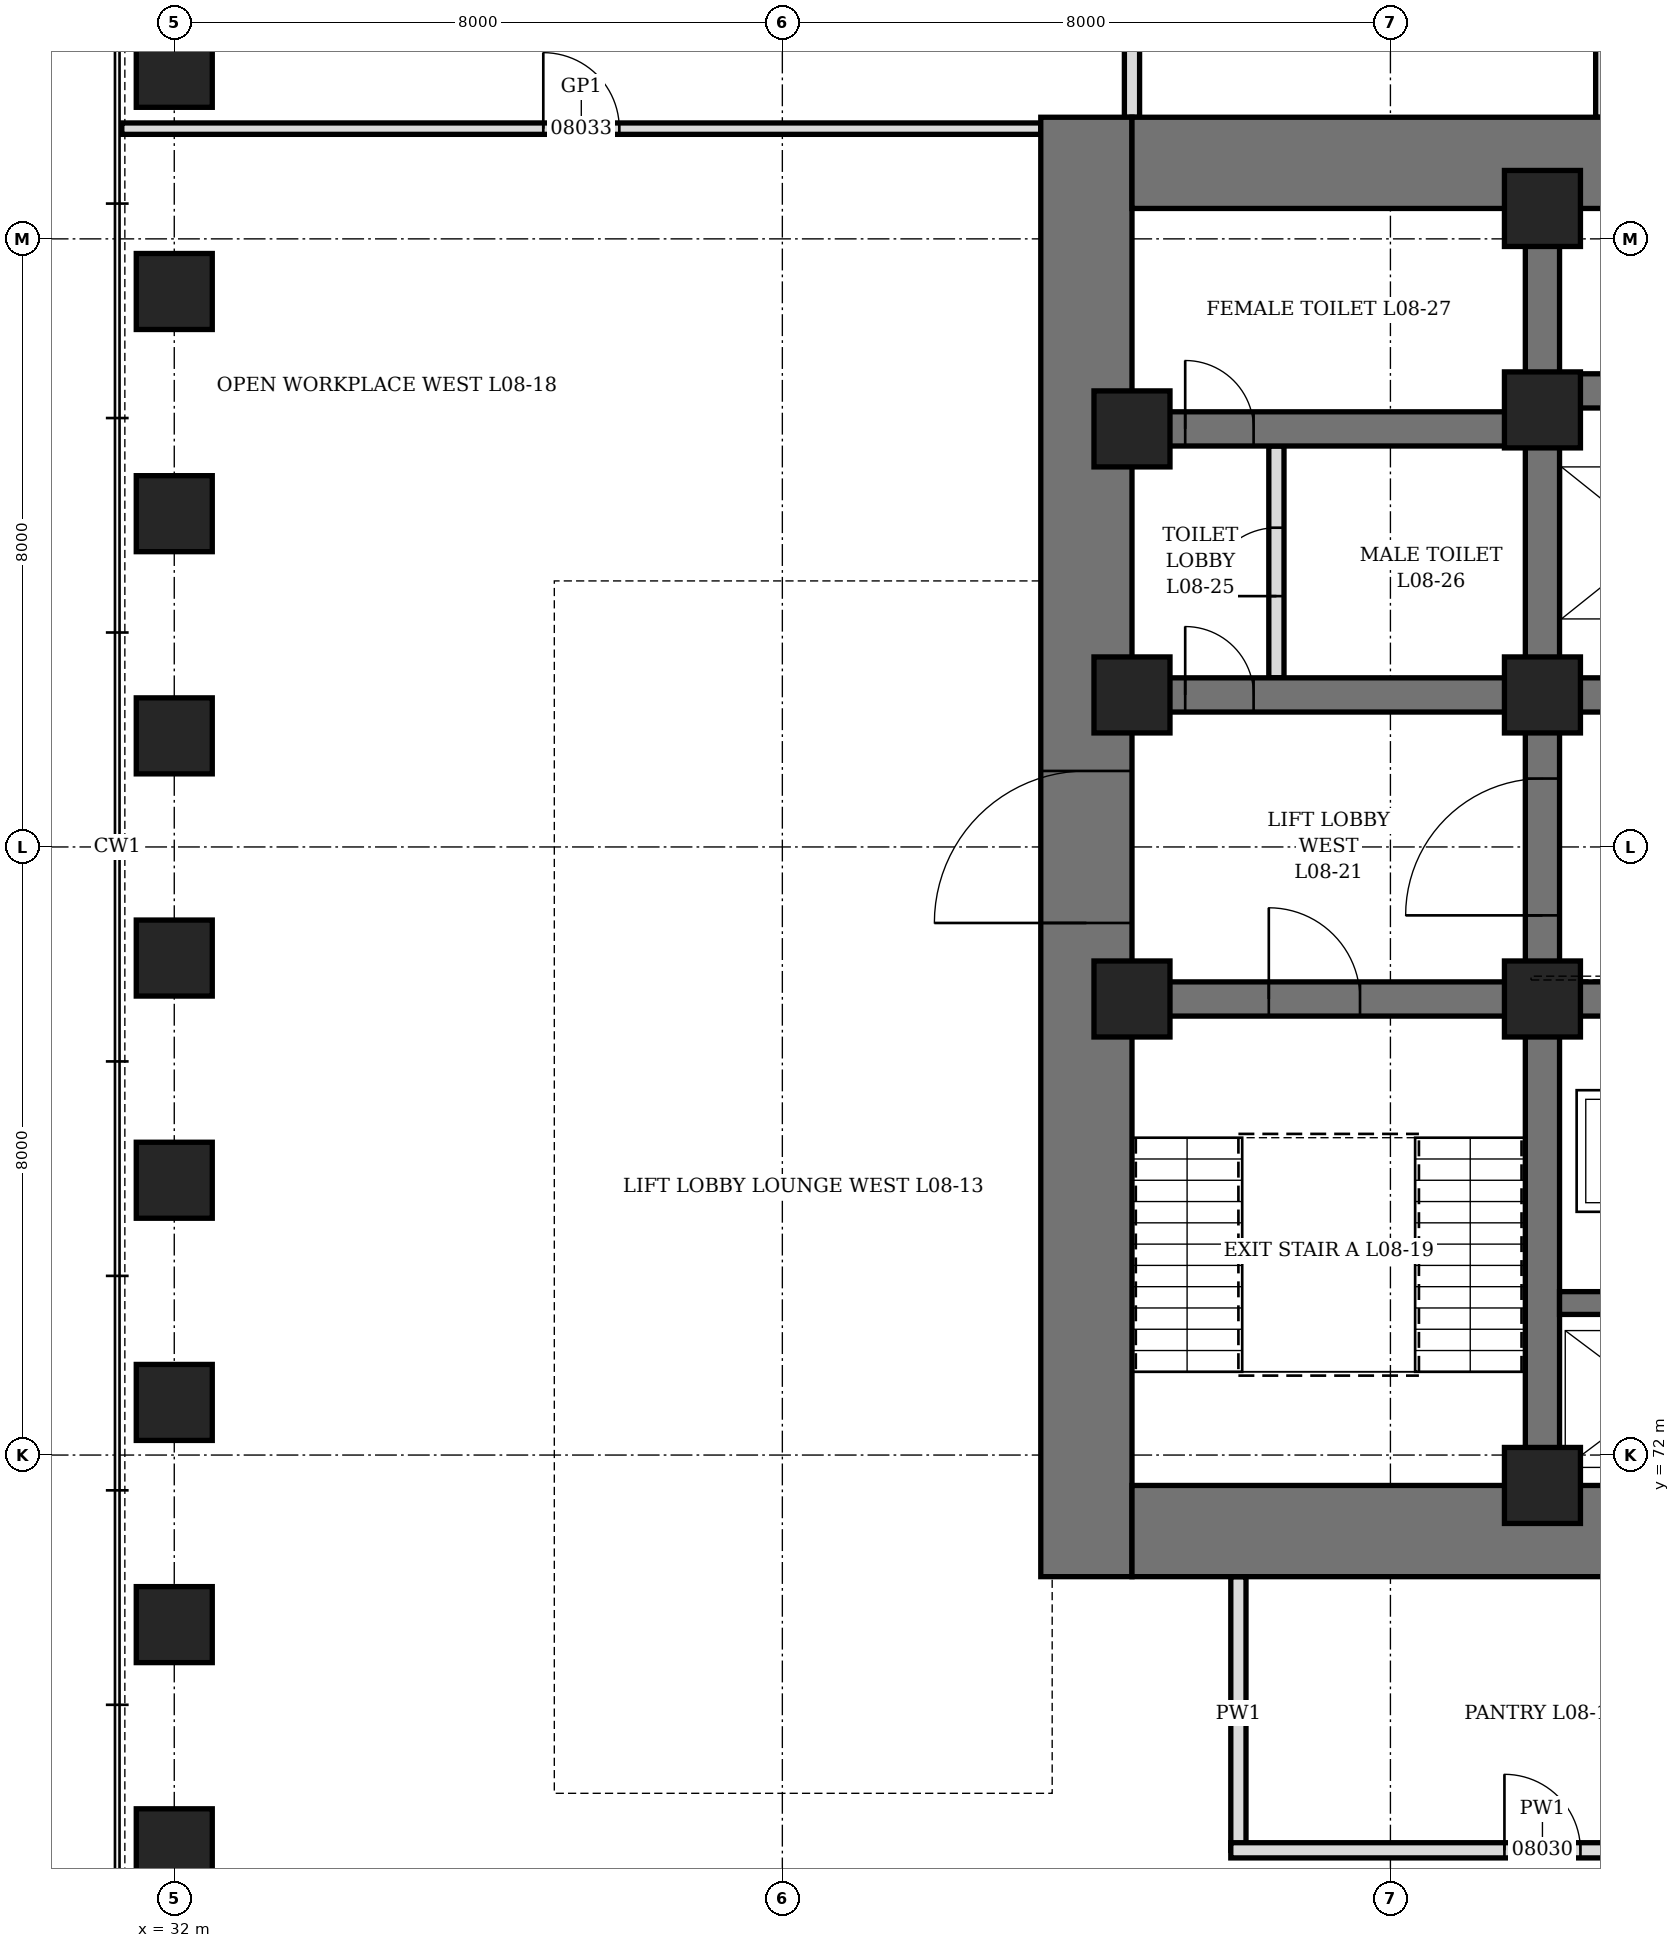
"""IFC4 building model, lengths in metres.
Left out: names, types, materials, properties, quantities, classifications, styles, units other than length and angle.
Written with IfcOpenShell. Run it as: python <this file> out.ifc"""

import sys

from ifc_helpers import new_model, si_unit, direction, frame, frame_2d, origin, origin_2d, place, context, subcontext, project, spatial, rectangle, hollow_rectangle, extrude, element, fill, save


model = new_model("IFC4")
c1 = context("Model", 3, precision=1e-05, world=origin(), true_north=direction((0.0, 1.0)))
c2 = subcontext(c1, "Body", "Model", "MODEL_VIEW")
j1 = project(units=[si_unit("LENGTHUNIT", "METRE"), si_unit("PLANEANGLEUNIT", "RADIAN")], contexts=[c1])
p1 = place(None, origin())
s1 = spatial("IfcSite", under=j1, at=p1, CompositionType="ELEMENT")
p2 = place(p1, origin())
s2 = spatial("IfcBuilding", under=s1, at=p2, CompositionType="ELEMENT")
p3 = place(p2, frame((0.0, 0.0, 43.3)))
s3 = spatial("IfcBuildingStorey", under=s2, at=p3, CompositionType="ELEMENT", Elevation=43.3)
for number, where, z_axis, x_axis in (
    (1, (32.0, 90.231, 0.0), (0.0, 0.0, 1.0), (0.0, 1.0, 0.0)),
    (2, (32.0, 87.308, 0.0), (0.0, 0.0, 1.0), (0.0, 1.0, 0.0)),
    (3, (32.0, 84.385, 0.0), (0.0, 0.0, 1.0), (0.0, 1.0, 0.0)),
    (4, (32.0, 81.461, 0.0), (0.0, 0.0, 1.0), (0.0, 1.0, 0.0)),
    (5, (32.0, 78.539, 0.0), (0.0, 0.0, 1.0), (0.0, 1.0, 0.0)),
    (6, (32.0, 75.615, 0.0), (0.0, 0.0, 1.0), (0.0, 1.0, 0.0)),
    (7, (32.0, 72.692, 0.0), (0.0, 0.0, 1.0), (0.0, 1.0, 0.0)),
    (8, (32.0, 69.769, 0.0), (0.0, 0.0, 1.0), (0.0, 1.0, 0.0)),
    (9, (32.0, 66.846, 0.0), (0.0, 0.0, 1.0), (0.0, 1.0, 0.0)),
):
    element("IfcColumn", number, at=place(p3, frame(where, z_axis=z_axis, x_axis=x_axis)), inside=s3, PredefinedType="COLUMN", context=c2, shape_type="SweptSolid", body=[
        extrude(hollow_rectangle(XDim=1.0, YDim=1.0, WallThickness=0.25, at=origin_2d()), origin(), (0.0, 0.0, 1.0), 4.2),
    ])
p4 = place(p3, frame((44.0, 70.4, 0.0), z_axis=(0.0, 0.0, 1.0), x_axis=(0.0, 1.0, 0.0)))
e10 = element("IfcWall", 10, at=p4, inside=s3, PredefinedType="SHEAR", context=c2, shape_type="SweptSolid", body=[
    extrude(rectangle(XDim=19.2, YDim=1.2, at=frame_2d((9.6, 0.0))), origin(), (0.0, 0.0, 1.0), 4.2),
])
p5 = place(p4, frame((8.6, 0.0, 0.0)))
e11 = element("IfcOpeningElement", 11, at=p5, cuts=e10, PredefinedType="OPENING", context=c2, shape_type="SweptSolid", body=[
    extrude(rectangle(XDim=2.0, YDim=2.4, at=frame_2d((1.0, 1.2))), frame((0.0, 0.61, 0.0), z_axis=(0.0, -1.0, 0.0), x_axis=(1.0, 0.0, 0.0)), (0.0, 0.0, 1.0), 1.22),
])
p6 = place(p3, frame((44.6, 71.0, 0.0), z_axis=(0.0, 0.0, 1.0), x_axis=(1.0, 0.0, 0.0)))
e12 = element("IfcWall", 12, at=p6, inside=s3, PredefinedType="SHEAR", context=c2, shape_type="SweptSolid", body=[
    extrude(rectangle(XDim=22.8, YDim=1.2, at=frame_2d((11.4, 0.0))), origin(), (0.0, 0.0, 1.0), 4.2),
])
p7 = place(p3, frame((44.6, 89.0, 0.0), z_axis=(0.0, 0.0, 1.0), x_axis=(1.0, 0.0, 0.0)))
e13 = element("IfcWall", 13, at=p7, inside=s3, PredefinedType="SHEAR", context=c2, shape_type="SweptSolid", body=[
    extrude(rectangle(XDim=22.8, YDim=1.2, at=frame_2d((11.4, 0.0))), origin(), (0.0, 0.0, 1.0), 4.2),
])
p8 = place(p7, frame((7.9, 0.0, 0.0)))
e14 = element("IfcOpeningElement", 14, at=p8, cuts=e13, PredefinedType="OPENING", context=c2, shape_type="SweptSolid", body=[
    extrude(rectangle(XDim=1.0, YDim=2.1, at=frame_2d((0.5, 1.05))), frame((0.0, 0.61, 0.0), z_axis=(0.0, -1.0, 0.0), x_axis=(1.0, 0.0, 0.0)), (0.0, 0.0, 1.0), 1.22),
])
p9 = place(p7, frame((12.025, 0.0, 0.0)))
e15 = element("IfcOpeningElement", 15, at=p9, cuts=e13, PredefinedType="OPENING", context=c2, shape_type="SweptSolid", body=[
    extrude(rectangle(XDim=0.9, YDim=2.1, at=frame_2d((0.45, 1.05))), frame((0.0, 0.61, 0.0), z_axis=(0.0, -1.0, 0.0), x_axis=(1.0, 0.0, 0.0)), (0.0, 0.0, 1.0), 1.22),
])
p10 = place(p7, frame((13.962, 0.0, 0.0)))
e16 = element("IfcOpeningElement", 16, at=p10, cuts=e13, PredefinedType="OPENING", context=c2, shape_type="SweptSolid", body=[
    extrude(rectangle(XDim=0.9, YDim=2.1, at=frame_2d((0.45, 1.05))), frame((0.0, 0.61, 0.0), z_axis=(0.0, -1.0, 0.0), x_axis=(1.0, 0.0, 0.0)), (0.0, 0.0, 1.0), 1.22),
])
p11 = place(p3, frame((50.0, 71.6, 0.0), z_axis=(0.0, 0.0, 1.0), x_axis=(0.0, 1.0, 0.0)))
e17 = element("IfcWall", 17, at=p11, inside=s3, PredefinedType="SHEAR", context=c2, shape_type="SweptSolid", body=[
    extrude(rectangle(XDim=16.8, YDim=0.45, at=frame_2d((8.4, 0.0))), origin(), (0.0, 0.0, 1.0), 4.2),
])
p12 = place(p11, frame((7.5, 0.0, 0.0)))
e18 = element("IfcOpeningElement", 18, at=p12, cuts=e17, PredefinedType="OPENING", context=c2, shape_type="SweptSolid", body=[
    extrude(rectangle(XDim=1.8, YDim=2.4, at=frame_2d((0.9, 1.2))), frame((0.0, 0.235, 0.0), z_axis=(0.0, -1.0, 0.0), x_axis=(1.0, 0.0, 0.0)), (0.0, 0.0, 1.0), 0.47),
])
p13 = place(p3, frame((44.6, 78.0, 0.0), z_axis=(0.0, 0.0, 1.0), x_axis=(1.0, 0.0, 0.0)))
e19 = element("IfcWall", 19, at=p13, inside=s3, PredefinedType="SHEAR", context=c2, shape_type="SweptSolid", body=[
    extrude(rectangle(XDim=5.175, YDim=0.45, at=frame_2d((2.587, 0.0))), origin(), (0.0, 0.0, 1.0), 4.2),
])
p14 = place(p13, frame((1.8, 0.0, 0.0)))
e20 = element("IfcOpeningElement", 20, at=p14, cuts=e19, PredefinedType="OPENING", context=c2, shape_type="SweptSolid", body=[
    extrude(rectangle(XDim=1.2, YDim=2.1, at=frame_2d((0.6, 1.05))), frame((0.0, 0.235, 0.0), z_axis=(0.0, -1.0, 0.0), x_axis=(1.0, 0.0, 0.0)), (0.0, 0.0, 1.0), 0.47),
])
p15 = place(p3, frame((44.6, 82.0, 0.0), z_axis=(0.0, 0.0, 1.0), x_axis=(1.0, 0.0, 0.0)))
e21 = element("IfcWall", 21, at=p15, inside=s3, PredefinedType="SHEAR", context=c2, shape_type="SweptSolid", body=[
    extrude(rectangle(XDim=5.175, YDim=0.45, at=frame_2d((2.587, 0.0))), origin(), (0.0, 0.0, 1.0), 4.2),
])
p16 = place(p15, frame((0.7, 0.0, 0.0)))
e22 = element("IfcOpeningElement", 22, at=p16, cuts=e21, PredefinedType="OPENING", context=c2, shape_type="SweptSolid", body=[
    extrude(rectangle(XDim=0.9, YDim=2.1, at=frame_2d((0.45, 1.05))), frame((0.0, 0.235, 0.0), z_axis=(0.0, -1.0, 0.0), x_axis=(1.0, 0.0, 0.0)), (0.0, 0.0, 1.0), 0.47),
])
p17 = place(p3, frame((44.6, 85.5, 0.0), z_axis=(0.0, 0.0, 1.0), x_axis=(1.0, 0.0, 0.0)))
e23 = element("IfcWall", 23, at=p17, inside=s3, PredefinedType="SHEAR", context=c2, shape_type="SweptSolid", body=[
    extrude(rectangle(XDim=5.175, YDim=0.45, at=frame_2d((2.587, 0.0))), origin(), (0.0, 0.0, 1.0), 4.2),
])
p18 = place(p17, frame((0.7, 0.0, 0.0)))
e24 = element("IfcOpeningElement", 24, at=p18, cuts=e23, PredefinedType="OPENING", context=c2, shape_type="SweptSolid", body=[
    extrude(rectangle(XDim=0.9, YDim=2.1, at=frame_2d((0.45, 1.05))), frame((0.0, 0.235, 0.0), z_axis=(0.0, -1.0, 0.0), x_axis=(1.0, 0.0, 0.0)), (0.0, 0.0, 1.0), 0.47),
])
p19 = place(p3, frame((50.225, 78.0, 0.0), z_axis=(0.0, 0.0, 1.0), x_axis=(1.0, 0.0, 0.0)))
e25 = element("IfcWall", 25, at=p19, inside=s3, PredefinedType="SHEAR", context=c2, shape_type="SweptSolid", body=[
    extrude(rectangle(XDim=11.55, YDim=0.45, at=frame_2d((5.775, 0.0))), origin(), (0.0, 0.0, 1.0), 4.2),
])
p20 = place(p19, frame((0.725, 0.0, 0.0)))
e26 = element("IfcOpeningElement", 26, at=p20, cuts=e25, PredefinedType="OPENING", context=c2, shape_type="SweptSolid", body=[
    extrude(rectangle(XDim=1.1, YDim=2.2, at=frame_2d((0.55, 1.1))), frame((0.0, 0.235, 0.0), z_axis=(0.0, -1.0, 0.0), x_axis=(1.0, 0.0, 0.0)), (0.0, 0.0, 1.0), 0.47),
])
p21 = place(p19, frame((3.725, 0.0, 0.0)))
e27 = element("IfcOpeningElement", 27, at=p21, cuts=e25, PredefinedType="OPENING", context=c2, shape_type="SweptSolid", body=[
    extrude(rectangle(XDim=1.1, YDim=2.2, at=frame_2d((0.55, 1.1))), frame((0.0, 0.235, 0.0), z_axis=(0.0, -1.0, 0.0), x_axis=(1.0, 0.0, 0.0)), (0.0, 0.0, 1.0), 0.47),
])
p22 = place(p19, frame((6.725, 0.0, 0.0)))
e28 = element("IfcOpeningElement", 28, at=p22, cuts=e25, PredefinedType="OPENING", context=c2, shape_type="SweptSolid", body=[
    extrude(rectangle(XDim=1.1, YDim=2.2, at=frame_2d((0.55, 1.1))), frame((0.0, 0.235, 0.0), z_axis=(0.0, -1.0, 0.0), x_axis=(1.0, 0.0, 0.0)), (0.0, 0.0, 1.0), 0.47),
])
p23 = place(p19, frame((9.725, 0.0, 0.0)))
e29 = element("IfcOpeningElement", 29, at=p23, cuts=e25, PredefinedType="OPENING", context=c2, shape_type="SweptSolid", body=[
    extrude(rectangle(XDim=1.1, YDim=2.2, at=frame_2d((0.55, 1.1))), frame((0.0, 0.235, 0.0), z_axis=(0.0, -1.0, 0.0), x_axis=(1.0, 0.0, 0.0)), (0.0, 0.0, 1.0), 0.47),
])
for number, where, z_axis, x_axis in (
    (30, (50.225, 82.0, 0.0), (0.0, 0.0, 1.0), (1.0, 0.0, 0.0)),
    (31, (50.225, 86.0, 0.0), (0.0, 0.0, 1.0), (1.0, 0.0, 0.0)),
):
    element("IfcWall", number, at=place(p3, frame(where, z_axis=z_axis, x_axis=x_axis)), inside=s3, PredefinedType="SHEAR", context=c2, shape_type="SweptSolid", body=[
        extrude(rectangle(XDim=11.55, YDim=0.45, at=frame_2d((5.775, 0.0))), origin(), (0.0, 0.0, 1.0), 4.2),
    ])
p24 = place(p3, frame((50.225, 74.0, 0.0), z_axis=(0.0, 0.0, 1.0), x_axis=(1.0, 0.0, 0.0)))
e32 = element("IfcWall", 32, at=p24, inside=s3, PredefinedType="SHEAR", context=c2, shape_type="SweptSolid", body=[
    extrude(rectangle(XDim=11.55, YDim=0.3, at=frame_2d((5.775, 0.0))), origin(), (0.0, 0.0, 1.0), 4.2),
])
for number, where, z_axis, x_axis in (
    (33, (44.6, 78.0, 0.0), (0.0, 0.0, 1.0), (1.0, 0.0, 0.0)),
    (34, (44.6, 82.0, 0.0), (0.0, 0.0, 1.0), (1.0, 0.0, 0.0)),
    (35, (44.6, 85.5, 0.0), (0.0, 0.0, 1.0), (1.0, 0.0, 0.0)),
    (36, (50.0, 71.6, 0.0), (0.0, 0.0, 1.0), (1.0, 0.0, 0.0)),
    (37, (50.0, 78.0, 0.0), (0.0, 0.0, 1.0), (1.0, 0.0, 0.0)),
    (38, (50.0, 82.0, 0.0), (0.0, 0.0, 1.0), (1.0, 0.0, 0.0)),
    (39, (50.0, 85.75, 0.0), (0.0, 0.0, 1.0), (1.0, 0.0, 0.0)),
    (40, (50.0, 88.4, 0.0), (0.0, 0.0, 1.0), (1.0, 0.0, 0.0)),
):
    element("IfcColumn", number, at=place(p3, frame(where, z_axis=z_axis, x_axis=x_axis)), inside=s3, PredefinedType="COLUMN", context=c2, shape_type="SweptSolid", body=[
        extrude(hollow_rectangle(XDim=1.0, YDim=1.0, WallThickness=0.15, at=origin_2d()), origin(), (0.0, 0.0, 1.0), 4.2),
    ])
p25 = place(p3, frame((46.5, 82.225, 0.0), z_axis=(0.0, 0.0, 1.0), x_axis=(0.0, 1.0, 0.0)))
e41 = element("IfcWall", 41, at=p25, inside=s3, PredefinedType="PARTITIONING", context=c2, shape_type="SweptSolid", body=[
    extrude(rectangle(XDim=3.05, YDim=0.2, at=frame_2d((1.525, 0.0))), origin(), (0.0, 0.0, 1.0), 4.04),
])
p26 = place(p25, frame((1.075, 0.0, 0.0)))
e42 = element("IfcOpeningElement", 42, at=p26, cuts=e41, PredefinedType="OPENING", context=c2, shape_type="SweptSolid", body=[
    extrude(rectangle(XDim=0.9, YDim=2.1, at=frame_2d((0.45, 1.05))), frame((0.0, 0.11, 0.0), z_axis=(0.0, -1.0, 0.0), x_axis=(1.0, 0.0, 0.0)), (0.0, 0.0, 1.0), 0.22),
])
p27 = place(p3, frame((46.0, 66.8, 0.0), z_axis=(0.0, 0.0, 1.0), x_axis=(0.0, 1.0, 0.0)))
e43 = element("IfcWall", 43, at=p27, inside=s3, PredefinedType="PARTITIONING", context=c2, shape_type="SweptSolid", body=[
    extrude(rectangle(XDim=3.6, YDim=0.2, at=frame_2d((1.8, 0.0))), origin(), (0.0, 0.0, 1.0), 4.04),
])
for number, where, z_axis, x_axis in (
    (44, (44.6, 89.6, 0.0), (0.0, 0.0, 1.0), (0.0, 1.0, 0.0)),
    (45, (50.8, 89.6, 0.0), (0.0, 0.0, 1.0), (0.0, 1.0, 0.0)),
):
    element("IfcWall", number, at=place(p3, frame(where, z_axis=z_axis, x_axis=x_axis)), inside=s3, PredefinedType="PARTITIONING", context=c2, shape_type="SweptSolid", body=[
        extrude(rectangle(XDim=3.0, YDim=0.2, at=frame_2d((1.5, 0.0))), origin(), (0.0, 0.0, 1.0), 4.04),
    ])
p28 = place(p3, frame((45.9, 66.8, 0.0), z_axis=(0.0, 0.0, 1.0), x_axis=(1.0, 0.0, 0.0)))
e46 = element("IfcWall", 46, at=p28, inside=s3, PredefinedType="PARTITIONING", context=c2, shape_type="SweptSolid", body=[
    extrude(rectangle(XDim=8.2, YDim=0.2, at=frame_2d((4.1, 0.0))), origin(), (0.0, 0.0, 1.0), 4.04),
])
p29 = place(p28, frame((3.6, 0.0, 0.0)))
e47 = element("IfcOpeningElement", 47, at=p29, cuts=e46, PredefinedType="OPENING", context=c2, shape_type="SweptSolid", body=[
    extrude(rectangle(XDim=1.0, YDim=2.1, at=frame_2d((0.5, 1.05))), frame((0.0, 0.11, 0.0), z_axis=(0.0, -1.0, 0.0), x_axis=(1.0, 0.0, 0.0)), (0.0, 0.0, 1.0), 0.22),
])
p30 = place(p3, frame((31.31, 89.45, 0.0), z_axis=(0.0, 0.0, 1.0), x_axis=(1.0, 0.0, 0.0)))
e48 = element("IfcWall", 48, at=p30, inside=s3, PredefinedType="PARTITIONING", context=c2, shape_type="SweptSolid", body=[
    extrude(rectangle(XDim=12.09, YDim=0.15, at=frame_2d((6.045, 0.0))), origin(), (0.0, 0.0, 1.0), 4.04),
])
p31 = place(p30, frame((5.545, 0.0, 0.0)))
e49 = element("IfcOpeningElement", 49, at=p31, cuts=e48, PredefinedType="OPENING", context=c2, shape_type="SweptSolid", body=[
    extrude(rectangle(XDim=1.0, YDim=2.4, at=frame_2d((0.5, 1.2))), frame((0.0, 0.085, 0.0), z_axis=(0.0, -1.0, 0.0), x_axis=(1.0, 0.0, 0.0)), (0.0, 0.0, 1.0), 0.17),
])
p32 = place(p16, origin())
e50 = element("IfcDoor", 50, at=p32, inside=s3, OperationType="SINGLE_SWING_LEFT", PredefinedType="DOOR", context=c2, shape_type="SweptSolid", body=[
    extrude(rectangle(XDim=0.9, YDim=2.1, at=frame_2d((0.45, 1.05))), frame((0.0, 0.225, 0.0), z_axis=(0.0, -1.0, 0.0), x_axis=(1.0, 0.0, 0.0)), (0.0, 0.0, 1.0), 0.449),
])
fill(e22, e50)
p33 = place(p26, origin())
e51 = element("IfcDoor", 51, at=p33, inside=s3, OperationType="SINGLE_SWING_RIGHT", PredefinedType="DOOR", context=c2, shape_type="SweptSolid", body=[
    extrude(rectangle(XDim=0.9, YDim=2.1, at=frame_2d((0.45, 1.05))), frame((0.0, 0.1, 0.0), z_axis=(0.0, -1.0, 0.0), x_axis=(1.0, 0.0, 0.0)), (0.0, 0.0, 1.0), 0.199),
])
fill(e42, e51)
p34 = place(p18, origin())
e52 = element("IfcDoor", 52, at=p34, inside=s3, OperationType="SINGLE_SWING_RIGHT", PredefinedType="DOOR", context=c2, shape_type="SweptSolid", body=[
    extrude(rectangle(XDim=0.9, YDim=2.1, at=frame_2d((0.45, 1.05))), frame((0.0, 0.225, 0.0), z_axis=(0.0, -1.0, 0.0), x_axis=(1.0, 0.0, 0.0)), (0.0, 0.0, 1.0), 0.449),
])
fill(e24, e52)
p35 = place(p14, origin())
e53 = element("IfcDoor", 53, at=p35, inside=s3, OperationType="SINGLE_SWING_LEFT", PredefinedType="DOOR", context=c2, shape_type="SweptSolid", body=[
    extrude(rectangle(XDim=1.2, YDim=2.1, at=frame_2d((0.6, 1.05))), frame((0.0, 0.225, 0.0), z_axis=(0.0, -1.0, 0.0), x_axis=(1.0, 0.0, 0.0)), (0.0, 0.0, 1.0), 0.449),
])
fill(e20, e53)
p36 = place(p5, origin())
e54 = element("IfcDoor", 54, at=p36, inside=s3, OperationType="DOUBLE_DOOR_SINGLE_SWING", PredefinedType="DOOR", context=c2, shape_type="SweptSolid", body=[
    extrude(rectangle(XDim=2.0, YDim=2.4, at=frame_2d((1.0, 1.2))), frame((0.0, 0.35, 0.0), z_axis=(0.0, -1.0, 0.0), x_axis=(1.0, 0.0, 0.0)), (0.0, 0.0, 1.0), 0.7),
])
fill(e11, e54)
p37 = place(p12, origin())
e55 = element("IfcDoor", 55, at=p37, inside=s3, OperationType="DOUBLE_DOOR_SINGLE_SWING", PredefinedType="DOOR", context=c2, shape_type="SweptSolid", body=[
    extrude(rectangle(XDim=1.8, YDim=2.4, at=frame_2d((0.9, 1.2))), frame((0.0, 0.225, 0.0), z_axis=(0.0, -1.0, 0.0), x_axis=(1.0, 0.0, 0.0)), (0.0, 0.0, 1.0), 0.449),
])
fill(e18, e55)
p38 = place(p29, origin())
e56 = element("IfcDoor", 56, at=p38, inside=s3, OperationType="SINGLE_SWING_LEFT", PredefinedType="DOOR", context=c2, shape_type="SweptSolid", body=[
    extrude(rectangle(XDim=1.0, YDim=2.1, at=frame_2d((0.5, 1.05))), frame((0.0, 0.1, 0.0), z_axis=(0.0, -1.0, 0.0), x_axis=(1.0, 0.0, 0.0)), (0.0, 0.0, 1.0), 0.199),
])
fill(e47, e56)
p39 = place(p31, origin())
e57 = element("IfcDoor", 57, at=p39, inside=s3, OperationType="SINGLE_SWING_RIGHT", PredefinedType="DOOR", context=c2, shape_type="SweptSolid", body=[
    extrude(rectangle(XDim=1.0, YDim=2.4, at=frame_2d((0.5, 1.2))), frame((0.0, 0.075, 0.0), z_axis=(0.0, -1.0, 0.0), x_axis=(1.0, 0.0, 0.0)), (0.0, 0.0, 1.0), 0.149),
])
fill(e49, e57)
save(model, sys.argv[1])
